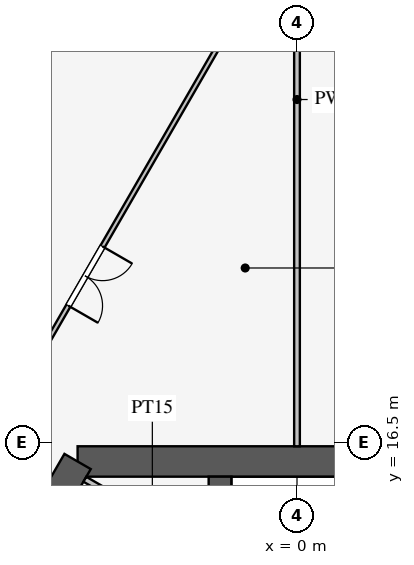
"""IFC4 building model, lengths in metres.
Left out: names, types, materials, properties, quantities, classifications, styles, units other than length and angle.
Written with IfcOpenShell. Run it as: python <this file> out.ifc"""

import sys

from ifc_helpers import new_model, si_unit, direction, frame, frame_2d, origin, place, context, subcontext, project, spatial, rectangle, extrude, element, fill, save


model = new_model("IFC4")
c1 = context("Model", 3, precision=1e-05, world=origin(), true_north=direction((0.0, 1.0)))
c2 = subcontext(c1, "Body", "Model", "MODEL_VIEW")
j1 = project(units=[si_unit("LENGTHUNIT", "METRE"), si_unit("PLANEANGLEUNIT", "RADIAN")], contexts=[c1])
p1 = place(None, origin())
s1 = spatial("IfcSite", under=j1, at=p1, CompositionType="ELEMENT")
p2 = place(p1, origin())
s2 = spatial("IfcBuilding", under=s1, at=p2, CompositionType="ELEMENT")
p3 = place(p2, frame((0.0, 0.0, 24.9)))
s3 = spatial("IfcBuildingStorey", under=s2, at=p3, CompositionType="ELEMENT", Elevation=24.9)
p4 = place(p3, frame((5.773, 16.0, 0.0), z_axis=(0.0, 0.0, 1.0), x_axis=(-1.0, 0.0, 0.0)))
e1 = element("IfcWall", 1, at=p4, inside=s3, PredefinedType="SHEAR", context=c2, shape_type="SweptSolid", body=[
    extrude(rectangle(XDim=11.547, YDim=0.8, at=frame_2d((5.773, 0.0))), origin(), (0.0, 0.0, 1.0), 4.2),
])
p5 = place(p3, frame((-5.773, 16.0, 0.0), z_axis=(0.0, 0.0, 1.0), x_axis=(-0.500002442456, -0.866023993627, 0.0)))
e2 = element("IfcWall", 2, at=p5, inside=s3, PredefinedType="SHEAR", context=c2, shape_type="SweptSolid", body=[
    extrude(rectangle(XDim=21.939, YDim=0.8, at=frame_2d((10.97, 0.0))), origin(), (0.0, 0.0, 1.0), 4.2),
])
p6 = place(p5, frame((17.27, 0.0, 0.0)))
e3 = element("IfcOpeningElement", 3, at=p6, cuts=e2, PredefinedType="OPENING", context=c2, shape_type="SweptSolid", body=[
    extrude(rectangle(XDim=1.2, YDim=2.1, at=frame_2d((0.6, 1.05))), frame((0.0, 0.41, 0.0), z_axis=(0.0, -1.0, 0.0), x_axis=(1.0, 0.0, 0.0)), (0.0, 0.0, 1.0), 0.82),
])
p7 = place(p5, frame((3.47, 0.0, 0.0)))
e4 = element("IfcOpeningElement", 4, at=p7, cuts=e2, PredefinedType="OPENING", context=c2, shape_type="SweptSolid", body=[
    extrude(rectangle(XDim=1.2, YDim=2.1, at=frame_2d((0.6, 1.05))), frame((0.0, 0.41, 0.0), z_axis=(0.0, -1.0, 0.0), x_axis=(1.0, 0.0, 0.0)), (0.0, 0.0, 1.0), 0.82),
])
p8 = place(p3, frame((-2.025, 6.525, 0.0), z_axis=(0.0, 0.0, 1.0), x_axis=(0.0, 1.0, 0.0)))
e5 = element("IfcWall", 5, at=p8, inside=s3, PredefinedType="SHEAR", context=c2, shape_type="SweptSolid", body=[
    extrude(rectangle(XDim=9.075, YDim=0.6, at=frame_2d((4.538, 0.0))), origin(), (0.0, 0.0, 1.0), 4.2),
])
p9 = place(p3, frame((-2.031, 13.482, 0.0), z_axis=(0.0, 0.0, 1.0), x_axis=(-0.866050731258, 0.499956128963, 0.0)))
e6 = element("IfcWall", 6, at=p9, inside=s3, PredefinedType="PARTITIONING", context=c2, shape_type="SweptSolid", body=[
    extrude(rectangle(XDim=4.1, YDim=0.15, at=frame_2d((2.05, 0.0))), origin(), (0.0, 0.0, 1.0), 4.0),
])
p10 = place(p3, frame((0.0, 16.4, 0.0), z_axis=(0.0, 0.0, 1.0), x_axis=(0.0, 1.0, 0.0)))
e7 = element("IfcWall", 7, at=p10, inside=s3, PredefinedType="PARTITIONING", context=c2, shape_type="SweptSolid", body=[
    extrude(rectangle(XDim=18.25, YDim=0.15, at=frame_2d((9.125, 0.0))), origin(), (0.0, 0.0, 1.0), 2.3),
])
p11 = place(p3, frame((-0.016, 30.491, 0.0), z_axis=(0.0, 0.0, 1.0), x_axis=(-0.50000091641, -0.866024874695, 0.0)))
e8 = element("IfcWall", 8, at=p11, inside=s3, PredefinedType="PARTITIONING", context=c2, shape_type="SweptSolid", body=[
    extrude(rectangle(XDim=52.796, YDim=0.12, at=frame_2d((26.398, 0.0))), origin(), (0.0, 0.0, 1.0), 2.9),
])
p12 = place(p11, frame((10.2, 0.0, 0.15)))
e9 = element("IfcOpeningElement", 9, at=p12, cuts=e8, PredefinedType="OPENING", context=c2, shape_type="SweptSolid", body=[
    extrude(rectangle(XDim=1.8, YDim=2.1, at=frame_2d((0.9, 1.05))), frame((0.0, 0.07, 0.0), z_axis=(0.0, -1.0, 0.0), x_axis=(1.0, 0.0, 0.0)), (0.0, 0.0, 1.0), 0.14),
])
p13 = place(p11, frame((40.8, 0.0, 0.15)))
e10 = element("IfcOpeningElement", 10, at=p13, cuts=e8, PredefinedType="OPENING", context=c2, shape_type="SweptSolid", body=[
    extrude(rectangle(XDim=1.8, YDim=2.1, at=frame_2d((0.9, 1.05))), frame((0.0, 0.07, 0.0), z_axis=(0.0, -1.0, 0.0), x_axis=(1.0, 0.0, 0.0)), (0.0, 0.0, 1.0), 0.14),
])
p14 = place(p12, origin())
e11 = element("IfcDoor", 11, at=p14, inside=s3, OperationType="DOUBLE_DOOR_SINGLE_SWING", PredefinedType="DOOR", context=c2, shape_type="SweptSolid", body=[
    extrude(rectangle(XDim=1.8, YDim=2.1, at=frame_2d((0.9, 1.05))), frame((0.0, 0.025, 0.0), z_axis=(0.0, -1.0, 0.0), x_axis=(1.0, 0.0, 0.0)), (0.0, 0.0, 1.0), 0.05),
])
fill(e9, e11)
save(model, sys.argv[1])
